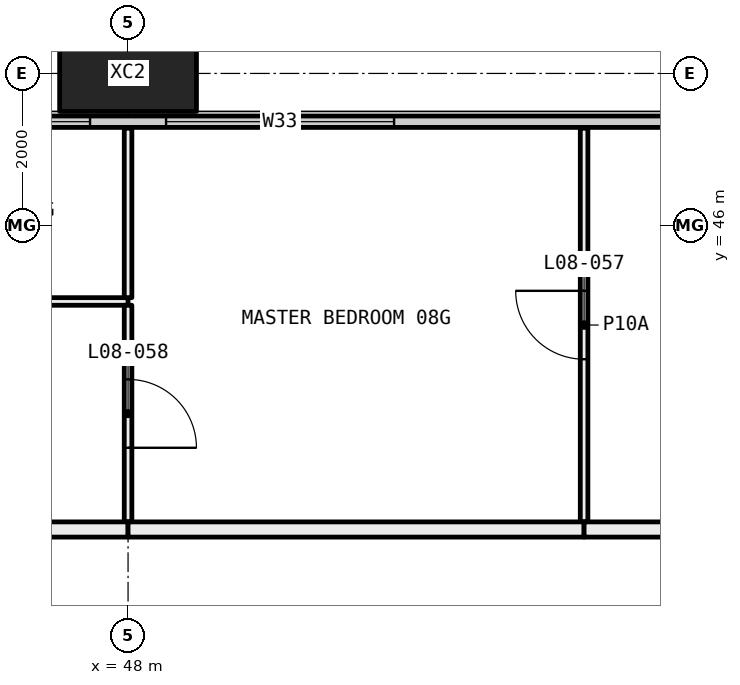
"""IFC4 building model, lengths in metres.
Left out: names, types, materials, properties, quantities, classifications, styles, units other than length and angle.
Written with IfcOpenShell. Run it as: python <this file> out.ifc"""

import sys

from ifc_helpers import new_model, si_unit, direction, frame, frame_2d, origin, origin_2d, place, context, subcontext, project, spatial, rectangle, hollow_rectangle, extrude, element, fill, save


model = new_model("IFC4")
c1 = context("Model", 3, precision=1e-05, world=origin(), true_north=direction((0.0, 1.0)))
c2 = subcontext(c1, "Body", "Model", "MODEL_VIEW")
j1 = project(units=[si_unit("LENGTHUNIT", "METRE"), si_unit("PLANEANGLEUNIT", "RADIAN")], contexts=[c1])
p1 = place(None, origin())
s1 = spatial("IfcSite", under=j1, at=p1, CompositionType="ELEMENT")
p2 = place(p1, origin())
s2 = spatial("IfcBuilding", under=s1, at=p2, CompositionType="ELEMENT")
p3 = place(p2, frame((0.0, 0.0, 40.35)))
s3 = spatial("IfcBuildingStorey", under=s2, at=p3, CompositionType="ELEMENT", Elevation=40.35)
p4 = place(p3, frame((48.0, 48.0, -0.4), z_axis=(0.0, 0.0, 1.0), x_axis=(1.0, 0.0, 0.0)))
e1 = element("IfcColumn", 1, at=p4, inside=s3, PredefinedType="COLUMN", context=c2, shape_type="SweptSolid", body=[
    extrude(hollow_rectangle(XDim=1.8, YDim=1.0, WallThickness=0.07, at=origin_2d()), origin(), (0.0, 0.0, 1.0), 3.45),
])
p5 = place(p3, frame((6.56, 47.365, 0.0), z_axis=(0.0, 0.0, 1.0), x_axis=(1.0, 0.0, 0.0)))
e2 = element("IfcWall", 2, at=p5, inside=s3, PredefinedType="ELEMENTEDWALL", context=c2, shape_type="SweptSolid", body=[
    extrude(rectangle(XDim=58.88, YDim=0.15, at=frame_2d((29.44, 0.0))), origin(), (0.0, 0.0, 1.0), 3.05),
])
p6 = place(p5, frame((0.44, 0.0, 0.45)))
e3 = element("IfcOpeningElement", 3, at=p6, cuts=e2, PredefinedType="OPENING", context=c2, shape_type="SweptSolid", body=[
    extrude(rectangle(XDim=4.5, YDim=2.55, at=frame_2d((2.25, 1.275))), frame((0.0, 0.085, 0.0), z_axis=(0.0, -1.0, 0.0), x_axis=(1.0, 0.0, 0.0)), (0.0, 0.0, 1.0), 0.17),
])
p7 = place(p5, frame((5.94, 0.0, 0.45)))
e4 = element("IfcOpeningElement", 4, at=p7, cuts=e2, PredefinedType="OPENING", context=c2, shape_type="SweptSolid", body=[
    extrude(rectangle(XDim=3.0, YDim=2.55, at=frame_2d((1.5, 1.275))), frame((0.0, 0.085, 0.0), z_axis=(0.0, -1.0, 0.0), x_axis=(1.0, 0.0, 0.0)), (0.0, 0.0, 1.0), 0.17),
])
p8 = place(p5, frame((13.94, 0.0, 0.45)))
e5 = element("IfcOpeningElement", 5, at=p8, cuts=e2, PredefinedType="OPENING", context=c2, shape_type="SweptSolid", body=[
    extrude(rectangle(XDim=3.0, YDim=2.55, at=frame_2d((1.5, 1.275))), frame((0.0, 0.085, 0.0), z_axis=(0.0, -1.0, 0.0), x_axis=(1.0, 0.0, 0.0)), (0.0, 0.0, 1.0), 0.17),
])
p9 = place(p5, frame((17.94, 0.0, 0.45)))
e6 = element("IfcOpeningElement", 6, at=p9, cuts=e2, PredefinedType="OPENING", context=c2, shape_type="SweptSolid", body=[
    extrude(rectangle(XDim=3.0, YDim=2.55, at=frame_2d((1.5, 1.275))), frame((0.0, 0.085, 0.0), z_axis=(0.0, -1.0, 0.0), x_axis=(1.0, 0.0, 0.0)), (0.0, 0.0, 1.0), 0.17),
])
p10 = place(p5, frame((26.94, 0.0, 0.45)))
e7 = element("IfcOpeningElement", 7, at=p10, cuts=e2, PredefinedType="OPENING", context=c2, shape_type="SweptSolid", body=[
    extrude(rectangle(XDim=2.0, YDim=2.55, at=frame_2d((1.0, 1.275))), frame((0.0, 0.085, 0.0), z_axis=(0.0, -1.0, 0.0), x_axis=(1.0, 0.0, 0.0)), (0.0, 0.0, 1.0), 0.17),
])
p11 = place(p5, frame((29.94, 0.0, 0.45)))
e8 = element("IfcOpeningElement", 8, at=p11, cuts=e2, PredefinedType="OPENING", context=c2, shape_type="SweptSolid", body=[
    extrude(rectangle(XDim=3.0, YDim=2.55, at=frame_2d((1.5, 1.275))), frame((0.0, 0.085, 0.0), z_axis=(0.0, -1.0, 0.0), x_axis=(1.0, 0.0, 0.0)), (0.0, 0.0, 1.0), 0.17),
])
p12 = place(p5, frame((37.94, 0.0, 0.45)))
e9 = element("IfcOpeningElement", 9, at=p12, cuts=e2, PredefinedType="OPENING", context=c2, shape_type="SweptSolid", body=[
    extrude(rectangle(XDim=3.0, YDim=2.55, at=frame_2d((1.5, 1.275))), frame((0.0, 0.085, 0.0), z_axis=(0.0, -1.0, 0.0), x_axis=(1.0, 0.0, 0.0)), (0.0, 0.0, 1.0), 0.17),
])
p13 = place(p5, frame((41.94, 0.0, 0.45)))
e10 = element("IfcOpeningElement", 10, at=p13, cuts=e2, PredefinedType="OPENING", context=c2, shape_type="SweptSolid", body=[
    extrude(rectangle(XDim=3.0, YDim=2.55, at=frame_2d((1.5, 1.275))), frame((0.0, 0.085, 0.0), z_axis=(0.0, -1.0, 0.0), x_axis=(1.0, 0.0, 0.0)), (0.0, 0.0, 1.0), 0.17),
])
p14 = place(p5, frame((50.94, 0.0, 0.45)))
e11 = element("IfcOpeningElement", 11, at=p14, cuts=e2, PredefinedType="OPENING", context=c2, shape_type="SweptSolid", body=[
    extrude(rectangle(XDim=2.0, YDim=2.55, at=frame_2d((1.0, 1.275))), frame((0.0, 0.085, 0.0), z_axis=(0.0, -1.0, 0.0), x_axis=(1.0, 0.0, 0.0)), (0.0, 0.0, 1.0), 0.17),
])
p15 = place(p5, frame((53.94, 0.0, 0.45)))
e12 = element("IfcOpeningElement", 12, at=p15, cuts=e2, PredefinedType="OPENING", context=c2, shape_type="SweptSolid", body=[
    extrude(rectangle(XDim=4.5, YDim=2.55, at=frame_2d((2.25, 1.275))), frame((0.0, 0.085, 0.0), z_axis=(0.0, -1.0, 0.0), x_axis=(1.0, 0.0, 0.0)), (0.0, 0.0, 1.0), 0.17),
])
p16 = place(p3, frame((48.0, 45.0, 0.0), z_axis=(0.0, 0.0, 1.0), x_axis=(-1.0, 0.0, 0.0)))
e13 = element("IfcWall", 13, at=p16, inside=s3, PredefinedType="PARTITIONING", context=c2, shape_type="SweptSolid", body=[
    extrude(rectangle(XDim=11.925, YDim=0.1, at=frame_2d((5.962, 0.0))), origin(), (0.0, 0.0, 1.0), 2.45),
])
p17 = place(p16, frame((5.512, 0.0, 0.0)))
e14 = element("IfcOpeningElement", 14, at=p17, cuts=e13, PredefinedType="OPENING", context=c2, shape_type="SweptSolid", body=[
    extrude(rectangle(XDim=0.9, YDim=2.1, at=frame_2d((0.45, 1.05))), frame((0.0, 0.06, 0.0), z_axis=(0.0, -1.0, 0.0), x_axis=(1.0, 0.0, 0.0)), (0.0, 0.0, 1.0), 0.12),
])
p18 = place(p3, frame((48.0, 42.1, 0.0), z_axis=(0.0, 0.0, 1.0), x_axis=(0.0, 1.0, 0.0)))
e15 = element("IfcWall", 15, at=p18, inside=s3, PredefinedType="PARTITIONING", context=c2, shape_type="SweptSolid", body=[
    extrude(rectangle(XDim=2.85, YDim=0.1, at=frame_2d((1.425, 0.0))), origin(), (0.0, 0.0, 1.0), 3.05),
])
p19 = place(p18, frame((0.975, 0.0, 0.0)))
e16 = element("IfcOpeningElement", 16, at=p19, cuts=e15, PredefinedType="OPENING", context=c2, shape_type="SweptSolid", body=[
    extrude(rectangle(XDim=0.9, YDim=2.1, at=frame_2d((0.45, 1.05))), frame((0.0, 0.06, 0.0), z_axis=(0.0, -1.0, 0.0), x_axis=(1.0, 0.0, 0.0)), (0.0, 0.0, 1.0), 0.12),
])
p20 = place(p3, frame((46.1, 42.0, 0.0), z_axis=(0.0, 0.0, 1.0), x_axis=(1.0, 0.0, 0.0)))
e17 = element("IfcWall", 17, at=p20, inside=s3, PredefinedType="PARTITIONING", context=c2, shape_type="SweptSolid", body=[
    extrude(rectangle(XDim=1.9, YDim=0.2, at=frame_2d((0.95, 0.0))), origin(), (0.0, 0.0, 1.0), 3.05),
])
p21 = place(p3, frame((48.0, 45.05, 0.0), z_axis=(0.0, 0.0, 1.0), x_axis=(0.0, 1.0, 0.0)))
e18 = element("IfcWall", 18, at=p21, inside=s3, PredefinedType="PARTITIONING", context=c2, shape_type="SweptSolid", body=[
    extrude(rectangle(XDim=2.23, YDim=0.1, at=frame_2d((1.115, 0.0))), origin(), (0.0, 0.0, 1.0), 3.05),
])
p22 = place(p3, frame((54.0, 42.1, 0.0), z_axis=(0.0, 0.0, 1.0), x_axis=(0.0, 1.0, 0.0)))
e19 = element("IfcWall", 19, at=p22, inside=s3, PredefinedType="PARTITIONING", context=c2, shape_type="SweptSolid", body=[
    extrude(rectangle(XDim=5.18, YDim=0.1, at=frame_2d((2.59, 0.0))), origin(), (0.0, 0.0, 1.0), 3.05),
])
p23 = place(p22, frame((2.14, 0.0, 0.0)))
e20 = element("IfcOpeningElement", 20, at=p23, cuts=e19, PredefinedType="OPENING", context=c2, shape_type="SweptSolid", body=[
    extrude(rectangle(XDim=0.9, YDim=2.1, at=frame_2d((0.45, 1.05))), frame((0.0, 0.06, 0.0), z_axis=(0.0, -1.0, 0.0), x_axis=(1.0, 0.0, 0.0)), (0.0, 0.0, 1.0), 0.12),
])
p24 = place(p3, frame((48.0, 42.0, 0.0), z_axis=(0.0, 0.0, 1.0), x_axis=(1.0, 0.0, 0.0)))
e21 = element("IfcWall", 21, at=p24, inside=s3, PredefinedType="PARTITIONING", context=c2, shape_type="SweptSolid", body=[
    extrude(rectangle(XDim=6.0, YDim=0.2, at=frame_2d((3.0, 0.0))), origin(), (0.0, 0.0, 1.0), 3.05),
])
p25 = place(p3, frame((54.0, 42.0, 0.0), z_axis=(0.0, 0.0, 1.0), x_axis=(1.0, 0.0, 0.0)))
e22 = element("IfcWall", 22, at=p25, inside=s3, PredefinedType="PARTITIONING", context=c2, shape_type="SweptSolid", body=[
    extrude(rectangle(XDim=6.0, YDim=0.2, at=frame_2d((3.0, 0.0))), origin(), (0.0, 0.0, 1.0), 3.05),
])
p26 = place(p25, frame((2.5, 0.0, 0.0)))
e23 = element("IfcOpeningElement", 23, at=p26, cuts=e22, PredefinedType="OPENING", context=c2, shape_type="SweptSolid", body=[
    extrude(rectangle(XDim=1.0, YDim=2.1, at=frame_2d((0.5, 1.05))), frame((0.0, 0.11, 0.0), z_axis=(0.0, -1.0, 0.0), x_axis=(1.0, 0.0, 0.0)), (0.0, 0.0, 1.0), 0.22),
])
p27 = place(p12, origin())
e24 = element("IfcWindow", 24, at=p27, inside=s3, PartitioningType="SINGLE_PANEL", PredefinedType="WINDOW", context=c2, shape_type="SweptSolid", body=[
    extrude(rectangle(XDim=3.0, YDim=2.55, at=frame_2d((1.5, 1.275))), frame((0.0, 0.03, 0.0), z_axis=(0.0, -1.0, 0.0), x_axis=(1.0, 0.0, 0.0)), (0.0, 0.0, 1.0), 0.06),
])
fill(e9, e24)
p28 = place(p13, origin())
e25 = element("IfcWindow", 25, at=p28, inside=s3, PartitioningType="SINGLE_PANEL", PredefinedType="WINDOW", context=c2, shape_type="SweptSolid", body=[
    extrude(rectangle(XDim=3.0, YDim=2.55, at=frame_2d((1.5, 1.275))), frame((0.0, 0.03, 0.0), z_axis=(0.0, -1.0, 0.0), x_axis=(1.0, 0.0, 0.0)), (0.0, 0.0, 1.0), 0.06),
])
fill(e10, e25)
p29 = place(p23, origin())
e26 = element("IfcDoor", 26, at=p29, inside=s3, OperationType="SINGLE_SWING_LEFT", PredefinedType="DOOR", context=c2, shape_type="SweptSolid", body=[
    extrude(rectangle(XDim=0.9, YDim=2.1, at=frame_2d((0.45, 1.05))), frame((0.0, 0.025, 0.0), z_axis=(0.0, -1.0, 0.0), x_axis=(1.0, 0.0, 0.0)), (0.0, 0.0, 1.0), 0.05),
])
fill(e20, e26)
p30 = place(p19, frame((0.9, 0.0, 0.0), x_axis=(-1.0, 0.0, 0.0)))
e27 = element("IfcDoor", 27, at=p30, inside=s3, OperationType="SINGLE_SWING_LEFT", PredefinedType="DOOR", context=c2, shape_type="SweptSolid", body=[
    extrude(rectangle(XDim=0.9, YDim=2.1, at=frame_2d((0.45, 1.05))), frame((0.0, 0.025, 0.0), z_axis=(0.0, -1.0, 0.0), x_axis=(1.0, 0.0, 0.0)), (0.0, 0.0, 1.0), 0.05),
])
fill(e16, e27)
save(model, sys.argv[1])
